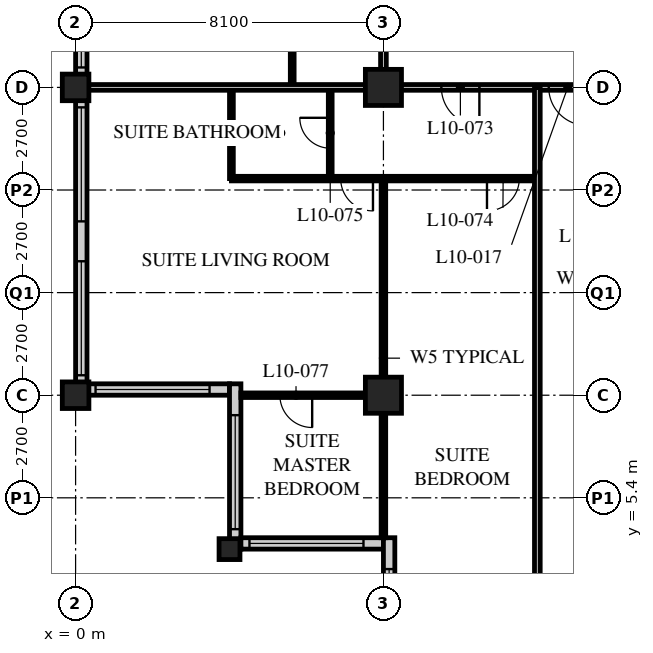
"""IFC4 building model, lengths in metres.
Left out: names, types, materials, properties, quantities, classifications, styles, units other than length and angle.
Written with IfcOpenShell. Run it as: python <this file> out.ifc"""

import sys

from ifc_helpers import new_model, si_unit, direction, frame, frame_2d, origin, origin_2d, place, context, subcontext, project, spatial, rectangle, hollow_rectangle, extrude, element, fill, save


model = new_model("IFC4")
c1 = context("Model", 3, precision=1e-05, world=origin(), true_north=direction((0.0, 1.0)))
c2 = subcontext(c1, "Body", "Model", "MODEL_VIEW")
j1 = project(units=[si_unit("LENGTHUNIT", "METRE"), si_unit("PLANEANGLEUNIT", "RADIAN")], contexts=[c1])
p1 = place(None, origin())
s1 = spatial("IfcSite", under=j1, at=p1, CompositionType="ELEMENT")
p2 = place(p1, origin())
s2 = spatial("IfcBuilding", under=s1, at=p2, CompositionType="ELEMENT")
p3 = place(p2, frame((0.0, 0.0, 46.6)))
s3 = spatial("IfcBuildingStorey", under=s2, at=p3, CompositionType="ELEMENT", Elevation=46.6)
for number, where, z_axis, x_axis in (
    (1, (0.0, 8.1, 0.0), (0.0, 0.0, 1.0), (1.0, 0.0, 0.0)),
    (2, (0.0, 16.2, 0.0), (0.0, 0.0, 1.0), (1.0, 0.0, 0.0)),
):
    element("IfcColumn", number, at=place(p3, frame(where, z_axis=z_axis, x_axis=x_axis)), inside=s3, PredefinedType="COLUMN", context=c2, shape_type="SweptSolid", body=[
        extrude(hollow_rectangle(XDim=0.7, YDim=0.7, WallThickness=0.06, at=origin_2d()), origin(), (0.0, 0.0, 1.0), 3.4),
    ])
p4 = place(p3, frame((4.05, 4.05, 0.0), z_axis=(0.0, 0.0, 1.0), x_axis=(1.0, 0.0, 0.0)))
e3 = element("IfcColumn", 3, at=p4, inside=s3, PredefinedType="COLUMN", context=c2, shape_type="SweptSolid", body=[
    extrude(hollow_rectangle(XDim=0.55, YDim=0.55, WallThickness=0.05, at=origin_2d()), origin(), (0.0, 0.0, 1.0), 3.4),
])
for number, where, z_axis, x_axis in (
    (4, (8.1, 8.1, 0.0), (0.0, 0.0, 1.0), (1.0, 0.0, 0.0)),
    (5, (8.1, 16.2, 0.0), (0.0, 0.0, 1.0), (1.0, 0.0, 0.0)),
):
    element("IfcColumn", number, at=place(p3, frame(where, z_axis=z_axis, x_axis=x_axis)), inside=s3, PredefinedType="COLUMN", context=c2, shape_type="SweptSolid", body=[
        extrude(hollow_rectangle(XDim=0.95, YDim=0.95, WallThickness=0.095, at=origin_2d()), origin(), (0.0, 0.0, 1.0), 3.4),
    ])
p5 = place(p3, frame((0.15, 40.2, 0.0), z_axis=(0.0, 0.0, 1.0), x_axis=(0.0, -1.0, 0.0)))
e6 = element("IfcWall", 6, at=p5, inside=s3, PredefinedType="SOLIDWALL", context=c2, shape_type="SweptSolid", body=[
    extrude(rectangle(XDim=32.1, YDim=0.3, at=frame_2d((16.05, 0.0))), origin(), (0.0, 0.0, 1.0), 3.19),
])
p6 = place(p5, frame((0.225, 0.0, 0.9)))
e7 = element("IfcOpeningElement", 7, at=p6, cuts=e6, PredefinedType="OPENING", context=c2, shape_type="SweptSolid", body=[
    extrude(rectangle(XDim=3.0, YDim=2.0, at=frame_2d((1.5, 1.0))), frame((0.0, 0.16, 0.0), z_axis=(0.0, -1.0, 0.0), x_axis=(1.0, 0.0, 0.0)), (0.0, 0.0, 1.0), 0.32),
])
p7 = place(p5, frame((4.275, 0.0, 0.9)))
e8 = element("IfcOpeningElement", 8, at=p7, cuts=e6, PredefinedType="OPENING", context=c2, shape_type="SweptSolid", body=[
    extrude(rectangle(XDim=3.0, YDim=2.0, at=frame_2d((1.5, 1.0))), frame((0.0, 0.16, 0.0), z_axis=(0.0, -1.0, 0.0), x_axis=(1.0, 0.0, 0.0)), (0.0, 0.0, 1.0), 0.32),
])
p8 = place(p5, frame((8.325, 0.0, 0.9)))
e9 = element("IfcOpeningElement", 9, at=p8, cuts=e6, PredefinedType="OPENING", context=c2, shape_type="SweptSolid", body=[
    extrude(rectangle(XDim=3.0, YDim=2.0, at=frame_2d((1.5, 1.0))), frame((0.0, 0.16, 0.0), z_axis=(0.0, -1.0, 0.0), x_axis=(1.0, 0.0, 0.0)), (0.0, 0.0, 1.0), 0.32),
])
p9 = place(p5, frame((12.375, 0.0, 0.9)))
e10 = element("IfcOpeningElement", 10, at=p9, cuts=e6, PredefinedType="OPENING", context=c2, shape_type="SweptSolid", body=[
    extrude(rectangle(XDim=3.0, YDim=2.0, at=frame_2d((1.5, 1.0))), frame((0.0, 0.16, 0.0), z_axis=(0.0, -1.0, 0.0), x_axis=(1.0, 0.0, 0.0)), (0.0, 0.0, 1.0), 0.32),
])
p10 = place(p5, frame((16.425, 0.0, 0.9)))
e11 = element("IfcOpeningElement", 11, at=p10, cuts=e6, PredefinedType="OPENING", context=c2, shape_type="SweptSolid", body=[
    extrude(rectangle(XDim=3.0, YDim=2.0, at=frame_2d((1.5, 1.0))), frame((0.0, 0.16, 0.0), z_axis=(0.0, -1.0, 0.0), x_axis=(1.0, 0.0, 0.0)), (0.0, 0.0, 1.0), 0.32),
])
p11 = place(p5, frame((20.475, 0.0, 0.9)))
e12 = element("IfcOpeningElement", 12, at=p11, cuts=e6, PredefinedType="OPENING", context=c2, shape_type="SweptSolid", body=[
    extrude(rectangle(XDim=3.0, YDim=2.0, at=frame_2d((1.5, 1.0))), frame((0.0, 0.16, 0.0), z_axis=(0.0, -1.0, 0.0), x_axis=(1.0, 0.0, 0.0)), (0.0, 0.0, 1.0), 0.32),
])
p12 = place(p5, frame((24.525, 0.0, 0.9)))
e13 = element("IfcOpeningElement", 13, at=p12, cuts=e6, PredefinedType="OPENING", context=c2, shape_type="SweptSolid", body=[
    extrude(rectangle(XDim=3.0, YDim=2.0, at=frame_2d((1.5, 1.0))), frame((0.0, 0.16, 0.0), z_axis=(0.0, -1.0, 0.0), x_axis=(1.0, 0.0, 0.0)), (0.0, 0.0, 1.0), 0.32),
])
p13 = place(p5, frame((28.575, 0.0, 0.9)))
e14 = element("IfcOpeningElement", 14, at=p13, cuts=e6, PredefinedType="OPENING", context=c2, shape_type="SweptSolid", body=[
    extrude(rectangle(XDim=3.0, YDim=2.0, at=frame_2d((1.5, 1.0))), frame((0.0, 0.16, 0.0), z_axis=(0.0, -1.0, 0.0), x_axis=(1.0, 0.0, 0.0)), (0.0, 0.0, 1.0), 0.32),
])
p14 = place(p3, frame((0.3, 8.25, 0.0), z_axis=(0.0, 0.0, 1.0), x_axis=(1.0, 0.0, 0.0)))
e15 = element("IfcWall", 15, at=p14, inside=s3, PredefinedType="SOLIDWALL", context=c2, shape_type="SweptSolid", body=[
    extrude(rectangle(XDim=3.75, YDim=0.3, at=frame_2d((1.875, 0.0))), origin(), (0.0, 0.0, 1.0), 3.19),
])
p15 = place(p14, frame((0.225, 0.0, 0.9)))
e16 = element("IfcOpeningElement", 16, at=p15, cuts=e15, PredefinedType="OPENING", context=c2, shape_type="SweptSolid", body=[
    extrude(rectangle(XDim=3.0, YDim=1.5, at=frame_2d((1.5, 0.75))), frame((0.0, 0.16, 0.0), z_axis=(0.0, -1.0, 0.0), x_axis=(1.0, 0.0, 0.0)), (0.0, 0.0, 1.0), 0.32),
])
p16 = place(p3, frame((4.2, 8.4, 0.0), z_axis=(0.0, 0.0, 1.0), x_axis=(0.0, -1.0, 0.0)))
e17 = element("IfcWall", 17, at=p16, inside=s3, PredefinedType="SOLIDWALL", context=c2, shape_type="SweptSolid", body=[
    extrude(rectangle(XDim=4.35, YDim=0.3, at=frame_2d((2.175, 0.0))), origin(), (0.0, 0.0, 1.0), 3.19),
])
p17 = place(p16, frame((0.825, 0.0, 0.9)))
e18 = element("IfcOpeningElement", 18, at=p17, cuts=e17, PredefinedType="OPENING", context=c2, shape_type="SweptSolid", body=[
    extrude(rectangle(XDim=3.0, YDim=1.5, at=frame_2d((1.5, 0.75))), frame((0.0, 0.16, 0.0), z_axis=(0.0, -1.0, 0.0), x_axis=(1.0, 0.0, 0.0)), (0.0, 0.0, 1.0), 0.32),
])
p18 = place(p3, frame((4.35, 4.2, 0.0), z_axis=(0.0, 0.0, 1.0), x_axis=(1.0, 0.0, 0.0)))
e19 = element("IfcWall", 19, at=p18, inside=s3, PredefinedType="SOLIDWALL", context=c2, shape_type="SweptSolid", body=[
    extrude(rectangle(XDim=3.75, YDim=0.3, at=frame_2d((1.875, 0.0))), origin(), (0.0, 0.0, 1.0), 3.19),
])
p19 = place(p18, frame((0.225, 0.0, 0.9)))
e20 = element("IfcOpeningElement", 20, at=p19, cuts=e19, PredefinedType="OPENING", context=c2, shape_type="SweptSolid", body=[
    extrude(rectangle(XDim=3.0, YDim=1.5, at=frame_2d((1.5, 0.75))), frame((0.0, 0.16, 0.0), z_axis=(0.0, -1.0, 0.0), x_axis=(1.0, 0.0, 0.0)), (0.0, 0.0, 1.0), 0.32),
])
p20 = place(p3, frame((8.25, 4.35, 0.0), z_axis=(0.0, 0.0, 1.0), x_axis=(0.0, -1.0, 0.0)))
e21 = element("IfcWall", 21, at=p20, inside=s3, PredefinedType="SOLIDWALL", context=c2, shape_type="SweptSolid", body=[
    extrude(rectangle(XDim=4.35, YDim=0.3, at=frame_2d((2.175, 0.0))), origin(), (0.0, 0.0, 1.0), 3.19),
])
p21 = place(p20, frame((0.825, 0.0, 0.9)))
e22 = element("IfcOpeningElement", 22, at=p21, cuts=e21, PredefinedType="OPENING", context=c2, shape_type="SweptSolid", body=[
    extrude(rectangle(XDim=3.0, YDim=1.5, at=frame_2d((1.5, 0.75))), frame((0.0, 0.16, 0.0), z_axis=(0.0, -1.0, 0.0), x_axis=(1.0, 0.0, 0.0)), (0.0, 0.0, 1.0), 0.32),
])
p22 = place(p3, frame((8.1, 16.2, 0.0), z_axis=(0.0, 0.0, 1.0), x_axis=(1.0, 0.0, 0.0)))
e23 = element("IfcWall", 23, at=p22, inside=s3, PredefinedType="PARTITIONING", context=c2, shape_type="SweptSolid", body=[
    extrude(rectangle(XDim=40.5, YDim=0.15, at=frame_2d((20.25, 0.0))), origin(), (0.0, 0.0, 1.0), 2.578),
])
p23 = place(p22, frame((4.35, 0.0, 0.0)))
e24 = element("IfcOpeningElement", 24, at=p23, cuts=e23, PredefinedType="OPENING", context=c2, shape_type="SweptSolid", body=[
    extrude(rectangle(XDim=1.0, YDim=2.1, at=frame_2d((0.5, 1.05))), frame((0.0, 0.085, 0.0), z_axis=(0.0, -1.0, 0.0), x_axis=(1.0, 0.0, 0.0)), (0.0, 0.0, 1.0), 0.17),
])
p24 = place(p22, frame((10.85, 0.0, 0.0)))
e25 = element("IfcOpeningElement", 25, at=p24, cuts=e23, PredefinedType="OPENING", context=c2, shape_type="SweptSolid", body=[
    extrude(rectangle(XDim=1.0, YDim=2.1, at=frame_2d((0.5, 1.05))), frame((0.0, 0.085, 0.0), z_axis=(0.0, -1.0, 0.0), x_axis=(1.0, 0.0, 0.0)), (0.0, 0.0, 1.0), 0.17),
])
p25 = place(p22, frame((12.75, 0.0, 0.0)))
e26 = element("IfcOpeningElement", 26, at=p25, cuts=e23, PredefinedType="OPENING", context=c2, shape_type="SweptSolid", body=[
    extrude(rectangle(XDim=1.0, YDim=2.1, at=frame_2d((0.5, 1.05))), frame((0.0, 0.085, 0.0), z_axis=(0.0, -1.0, 0.0), x_axis=(1.0, 0.0, 0.0)), (0.0, 0.0, 1.0), 0.17),
])
p26 = place(p22, frame((18.95, 0.0, 0.0)))
e27 = element("IfcOpeningElement", 27, at=p26, cuts=e23, PredefinedType="OPENING", context=c2, shape_type="SweptSolid", body=[
    extrude(rectangle(XDim=1.0, YDim=2.1, at=frame_2d((0.5, 1.05))), frame((0.0, 0.085, 0.0), z_axis=(0.0, -1.0, 0.0), x_axis=(1.0, 0.0, 0.0)), (0.0, 0.0, 1.0), 0.17),
])
p27 = place(p22, frame((20.55, 0.0, 0.0)))
e28 = element("IfcOpeningElement", 28, at=p27, cuts=e23, PredefinedType="OPENING", context=c2, shape_type="SweptSolid", body=[
    extrude(rectangle(XDim=1.0, YDim=2.1, at=frame_2d((0.5, 1.05))), frame((0.0, 0.085, 0.0), z_axis=(0.0, -1.0, 0.0), x_axis=(1.0, 0.0, 0.0)), (0.0, 0.0, 1.0), 0.17),
])
p28 = place(p22, frame((27.05, 0.0, 0.0)))
e29 = element("IfcOpeningElement", 29, at=p28, cuts=e23, PredefinedType="OPENING", context=c2, shape_type="SweptSolid", body=[
    extrude(rectangle(XDim=1.0, YDim=2.1, at=frame_2d((0.5, 1.05))), frame((0.0, 0.085, 0.0), z_axis=(0.0, -1.0, 0.0), x_axis=(1.0, 0.0, 0.0)), (0.0, 0.0, 1.0), 0.17),
])
p29 = place(p22, frame((28.95, 0.0, 0.0)))
e30 = element("IfcOpeningElement", 30, at=p29, cuts=e23, PredefinedType="OPENING", context=c2, shape_type="SweptSolid", body=[
    extrude(rectangle(XDim=1.0, YDim=2.1, at=frame_2d((0.5, 1.05))), frame((0.0, 0.085, 0.0), z_axis=(0.0, -1.0, 0.0), x_axis=(1.0, 0.0, 0.0)), (0.0, 0.0, 1.0), 0.17),
])
p30 = place(p22, frame((34.85, 0.0, 0.0)))
e31 = element("IfcOpeningElement", 31, at=p30, cuts=e23, PredefinedType="OPENING", context=c2, shape_type="SweptSolid", body=[
    extrude(rectangle(XDim=1.0, YDim=2.1, at=frame_2d((0.5, 1.05))), frame((0.0, 0.085, 0.0), z_axis=(0.0, -1.0, 0.0), x_axis=(1.0, 0.0, 0.0)), (0.0, 0.0, 1.0), 0.17),
])
p31 = place(p22, frame((1.525, 0.0, 0.0)))
e32 = element("IfcOpeningElement", 32, at=p31, cuts=e23, PredefinedType="OPENING", context=c2, shape_type="SweptSolid", body=[
    extrude(rectangle(XDim=1.0, YDim=2.1, at=frame_2d((0.5, 1.05))), frame((0.0, 0.085, 0.0), z_axis=(0.0, -1.0, 0.0), x_axis=(1.0, 0.0, 0.0)), (0.0, 0.0, 1.0), 0.17),
])
p32 = place(p22, frame((37.975, 0.0, 0.0)))
e33 = element("IfcOpeningElement", 33, at=p32, cuts=e23, PredefinedType="OPENING", context=c2, shape_type="SweptSolid", body=[
    extrude(rectangle(XDim=1.0, YDim=2.1, at=frame_2d((0.5, 1.05))), frame((0.0, 0.085, 0.0), z_axis=(0.0, -1.0, 0.0), x_axis=(1.0, 0.0, 0.0)), (0.0, 0.0, 1.0), 0.17),
])
p33 = place(p3, frame((8.1, 16.2, 0.0), z_axis=(0.0, 0.0, 1.0), x_axis=(0.0, 1.0, 0.0)))
e34 = element("IfcWall", 34, at=p33, inside=s3, PredefinedType="PARTITIONING", context=c2, shape_type="SweptSolid", body=[
    extrude(rectangle(XDim=26.1, YDim=0.15, at=frame_2d((13.05, 0.0))), origin(), (0.0, 0.0, 1.0), 2.578),
])
p34 = place(p33, frame((2.75, 0.0, 0.0)))
e35 = element("IfcOpeningElement", 35, at=p34, cuts=e34, PredefinedType="OPENING", context=c2, shape_type="SweptSolid", body=[
    extrude(rectangle(XDim=1.0, YDim=2.1, at=frame_2d((0.5, 1.05))), frame((0.0, 0.085, 0.0), z_axis=(0.0, -1.0, 0.0), x_axis=(1.0, 0.0, 0.0)), (0.0, 0.0, 1.0), 0.17),
])
p35 = place(p33, frame((4.35, 0.0, 0.0)))
e36 = element("IfcOpeningElement", 36, at=p35, cuts=e34, PredefinedType="OPENING", context=c2, shape_type="SweptSolid", body=[
    extrude(rectangle(XDim=1.0, YDim=2.1, at=frame_2d((0.5, 1.05))), frame((0.0, 0.085, 0.0), z_axis=(0.0, -1.0, 0.0), x_axis=(1.0, 0.0, 0.0)), (0.0, 0.0, 1.0), 0.17),
])
p36 = place(p33, frame((10.85, 0.0, 0.0)))
e37 = element("IfcOpeningElement", 37, at=p36, cuts=e34, PredefinedType="OPENING", context=c2, shape_type="SweptSolid", body=[
    extrude(rectangle(XDim=1.0, YDim=2.1, at=frame_2d((0.5, 1.05))), frame((0.0, 0.085, 0.0), z_axis=(0.0, -1.0, 0.0), x_axis=(1.0, 0.0, 0.0)), (0.0, 0.0, 1.0), 0.17),
])
p37 = place(p33, frame((12.45, 0.0, 0.0)))
e38 = element("IfcOpeningElement", 38, at=p37, cuts=e34, PredefinedType="OPENING", context=c2, shape_type="SweptSolid", body=[
    extrude(rectangle(XDim=1.0, YDim=2.1, at=frame_2d((0.5, 1.05))), frame((0.0, 0.085, 0.0), z_axis=(0.0, -1.0, 0.0), x_axis=(1.0, 0.0, 0.0)), (0.0, 0.0, 1.0), 0.17),
])
p38 = place(p33, frame((18.65, 0.0, 0.0)))
e39 = element("IfcOpeningElement", 39, at=p38, cuts=e34, PredefinedType="OPENING", context=c2, shape_type="SweptSolid", body=[
    extrude(rectangle(XDim=1.0, YDim=2.1, at=frame_2d((0.5, 1.05))), frame((0.0, 0.085, 0.0), z_axis=(0.0, -1.0, 0.0), x_axis=(1.0, 0.0, 0.0)), (0.0, 0.0, 1.0), 0.17),
])
p39 = place(p33, frame((22.7, 0.0, 0.0)))
e40 = element("IfcOpeningElement", 40, at=p39, cuts=e34, PredefinedType="OPENING", context=c2, shape_type="SweptSolid", body=[
    extrude(rectangle(XDim=1.0, YDim=2.1, at=frame_2d((0.5, 1.05))), frame((0.0, 0.085, 0.0), z_axis=(0.0, -1.0, 0.0), x_axis=(1.0, 0.0, 0.0)), (0.0, 0.0, 1.0), 0.17),
])
p40 = place(p3, frame((5.7, 16.2, 0.0), z_axis=(0.0, 0.0, 1.0), x_axis=(0.0, 1.0, 0.0)))
e41 = element("IfcWall", 41, at=p40, inside=s3, PredefinedType="PARTITIONING", context=c2, shape_type="SweptSolid", body=[
    extrude(rectangle(XDim=2.6, YDim=0.1, at=frame_2d((1.3, 0.0))), origin(), (0.0, 0.0, 1.0), 3.19),
])
p41 = place(p3, frame((6.7, 16.2, 0.0), z_axis=(0.0, 0.0, 1.0), x_axis=(0.0, -1.0, 0.0)))
e42 = element("IfcWall", 42, at=p41, inside=s3, PredefinedType="PARTITIONING", context=c2, shape_type="SweptSolid", body=[
    extrude(rectangle(XDim=2.4, YDim=0.1, at=frame_2d((1.2, 0.0))), origin(), (0.0, 0.0, 1.0), 3.19),
])
p42 = place(p41, frame((0.8, 0.0, 0.0)))
e43 = element("IfcOpeningElement", 43, at=p42, cuts=e42, PredefinedType="OPENING", context=c2, shape_type="SweptSolid", body=[
    extrude(rectangle(XDim=0.8, YDim=2.1, at=frame_2d((0.4, 1.05))), frame((0.0, 0.06, 0.0), z_axis=(0.0, -1.0, 0.0), x_axis=(1.0, 0.0, 0.0)), (0.0, 0.0, 1.0), 0.12),
])
p43 = place(p3, frame((4.1, 16.2, 0.0), z_axis=(0.0, 0.0, 1.0), x_axis=(0.0, -1.0, 0.0)))
e44 = element("IfcWall", 44, at=p43, inside=s3, PredefinedType="PARTITIONING", context=c2, shape_type="SweptSolid", body=[
    extrude(rectangle(XDim=2.4, YDim=0.1, at=frame_2d((1.2, 0.0))), origin(), (0.0, 0.0, 1.0), 3.19),
])
p44 = place(p3, frame((4.1, 13.8, 0.0), z_axis=(0.0, 0.0, 1.0), x_axis=(1.0, 0.0, 0.0)))
e45 = element("IfcWall", 45, at=p44, inside=s3, PredefinedType="PARTITIONING", context=c2, shape_type="SweptSolid", body=[
    extrude(rectangle(XDim=8.05, YDim=0.12, at=frame_2d((4.025, 0.0))), origin(), (0.0, 0.0, 1.0), 3.19),
])
p45 = place(p44, frame((6.725, 0.0, 0.0)))
e46 = element("IfcOpeningElement", 46, at=p45, cuts=e45, PredefinedType="OPENING", context=c2, shape_type="SweptSolid", body=[
    extrude(rectangle(XDim=0.85, YDim=2.1, at=frame_2d((0.425, 1.05))), frame((0.0, 0.07, 0.0), z_axis=(0.0, -1.0, 0.0), x_axis=(1.0, 0.0, 0.0)), (0.0, 0.0, 1.0), 0.14),
])
p46 = place(p44, frame((2.875, 0.0, 0.0)))
e47 = element("IfcOpeningElement", 47, at=p46, cuts=e45, PredefinedType="OPENING", context=c2, shape_type="SweptSolid", body=[
    extrude(rectangle(XDim=0.85, YDim=2.1, at=frame_2d((0.425, 1.05))), frame((0.0, 0.07, 0.0), z_axis=(0.0, -1.0, 0.0), x_axis=(1.0, 0.0, 0.0)), (0.0, 0.0, 1.0), 0.14),
])
p47 = place(p3, frame((8.1, 13.8, 0.0), z_axis=(0.0, 0.0, 1.0), x_axis=(0.0, -1.0, 0.0)))
e48 = element("IfcWall", 48, at=p47, inside=s3, PredefinedType="PARTITIONING", context=c2, shape_type="SweptSolid", body=[
    extrude(rectangle(XDim=9.45, YDim=0.12, at=frame_2d((4.725, 0.0))), origin(), (0.0, 0.0, 1.0), 2.578),
])
p48 = place(p3, frame((8.1, 8.1, 0.0), z_axis=(0.0, 0.0, 1.0), x_axis=(-1.0, 0.0, 0.0)))
e49 = element("IfcWall", 49, at=p48, inside=s3, PredefinedType="PARTITIONING", context=c2, shape_type="SweptSolid", body=[
    extrude(rectangle(XDim=3.75, YDim=0.12, at=frame_2d((1.875, 0.0))), origin(), (0.0, 0.0, 1.0), 2.578),
])
p49 = place(p48, frame((1.875, 0.0, 0.0)))
e50 = element("IfcOpeningElement", 50, at=p49, cuts=e49, PredefinedType="OPENING", context=c2, shape_type="SweptSolid", body=[
    extrude(rectangle(XDim=0.85, YDim=2.1, at=frame_2d((0.425, 1.05))), frame((0.0, 0.07, 0.0), z_axis=(0.0, -1.0, 0.0), x_axis=(1.0, 0.0, 0.0)), (0.0, 0.0, 1.0), 0.14),
])
p50 = place(p3, frame((0.3, 16.2, 0.0), z_axis=(0.0, 0.0, 1.0), x_axis=(1.0, 0.0, 0.0)))
e51 = element("IfcWall", 51, at=p50, inside=s3, PredefinedType="PARTITIONING", context=c2, shape_type="SweptSolid", body=[
    extrude(rectangle(XDim=7.8, YDim=0.15, at=frame_2d((3.9, 0.0))), origin(), (0.0, 0.0, 1.0), 2.578),
])
p51 = place(p3, frame((12.15, 16.2, 0.0), z_axis=(0.0, 0.0, 1.0), x_axis=(0.0, -1.0, 0.0)))
e52 = element("IfcWall", 52, at=p51, inside=s3, PredefinedType="PARTITIONING", context=c2, shape_type="SweptSolid", body=[
    extrude(rectangle(XDim=15.9, YDim=0.15, at=frame_2d((7.95, 0.0))), origin(), (0.0, 0.0, 1.0), 3.19),
])
p52 = place(p11, origin())
e53 = element("IfcWindow", 53, at=p52, inside=s3, PartitioningType="SINGLE_PANEL", PredefinedType="WINDOW", context=c2, shape_type="SweptSolid", body=[
    extrude(rectangle(XDim=3.0, YDim=2.0, at=frame_2d((1.5, 1.0))), frame((0.0, 0.03, 0.0), z_axis=(0.0, -1.0, 0.0), x_axis=(1.0, 0.0, 0.0)), (0.0, 0.0, 1.0), 0.06),
])
fill(e12, e53)
p53 = place(p12, origin())
e54 = element("IfcWindow", 54, at=p53, inside=s3, PartitioningType="SINGLE_PANEL", PredefinedType="WINDOW", context=c2, shape_type="SweptSolid", body=[
    extrude(rectangle(XDim=3.0, YDim=2.0, at=frame_2d((1.5, 1.0))), frame((0.0, 0.03, 0.0), z_axis=(0.0, -1.0, 0.0), x_axis=(1.0, 0.0, 0.0)), (0.0, 0.0, 1.0), 0.06),
])
fill(e13, e54)
p54 = place(p13, origin())
e55 = element("IfcWindow", 55, at=p54, inside=s3, PartitioningType="SINGLE_PANEL", PredefinedType="WINDOW", context=c2, shape_type="SweptSolid", body=[
    extrude(rectangle(XDim=3.0, YDim=2.0, at=frame_2d((1.5, 1.0))), frame((0.0, 0.03, 0.0), z_axis=(0.0, -1.0, 0.0), x_axis=(1.0, 0.0, 0.0)), (0.0, 0.0, 1.0), 0.06),
])
fill(e14, e55)
p55 = place(p15, origin())
e56 = element("IfcWindow", 56, at=p55, inside=s3, PartitioningType="SINGLE_PANEL", PredefinedType="WINDOW", context=c2, shape_type="SweptSolid", body=[
    extrude(rectangle(XDim=3.0, YDim=1.5, at=frame_2d((1.5, 0.75))), frame((0.0, 0.03, 0.0), z_axis=(0.0, -1.0, 0.0), x_axis=(1.0, 0.0, 0.0)), (0.0, 0.0, 1.0), 0.06),
])
fill(e16, e56)
p56 = place(p17, origin())
e57 = element("IfcWindow", 57, at=p56, inside=s3, PartitioningType="SINGLE_PANEL", PredefinedType="WINDOW", context=c2, shape_type="SweptSolid", body=[
    extrude(rectangle(XDim=3.0, YDim=1.5, at=frame_2d((1.5, 0.75))), frame((0.0, 0.03, 0.0), z_axis=(0.0, -1.0, 0.0), x_axis=(1.0, 0.0, 0.0)), (0.0, 0.0, 1.0), 0.06),
])
fill(e18, e57)
p57 = place(p19, origin())
e58 = element("IfcWindow", 58, at=p57, inside=s3, PartitioningType="SINGLE_PANEL", PredefinedType="WINDOW", context=c2, shape_type="SweptSolid", body=[
    extrude(rectangle(XDim=3.0, YDim=1.5, at=frame_2d((1.5, 0.75))), frame((0.0, 0.03, 0.0), z_axis=(0.0, -1.0, 0.0), x_axis=(1.0, 0.0, 0.0)), (0.0, 0.0, 1.0), 0.06),
])
fill(e20, e58)
p58 = place(p21, origin())
e59 = element("IfcWindow", 59, at=p58, inside=s3, PartitioningType="SINGLE_PANEL", PredefinedType="WINDOW", context=c2, shape_type="SweptSolid", body=[
    extrude(rectangle(XDim=3.0, YDim=1.5, at=frame_2d((1.5, 0.75))), frame((0.0, 0.03, 0.0), z_axis=(0.0, -1.0, 0.0), x_axis=(1.0, 0.0, 0.0)), (0.0, 0.0, 1.0), 0.06),
])
fill(e22, e59)
p59 = place(p23, origin())
e60 = element("IfcDoor", 60, at=p59, inside=s3, OperationType="SINGLE_SWING_LEFT", PredefinedType="DOOR", context=c2, shape_type="SweptSolid", body=[
    extrude(rectangle(XDim=1.0, YDim=2.1, at=frame_2d((0.5, 1.05))), frame((0.0, 0.025, 0.0), z_axis=(0.0, -1.0, 0.0), x_axis=(1.0, 0.0, 0.0)), (0.0, 0.0, 1.0), 0.05),
])
fill(e24, e60)
p60 = place(p31, origin())
e61 = element("IfcDoor", 61, at=p60, inside=s3, OperationType="SINGLE_SWING_LEFT", PredefinedType="DOOR", context=c2, shape_type="SweptSolid", body=[
    extrude(rectangle(XDim=1.0, YDim=2.1, at=frame_2d((0.5, 1.05))), frame((0.0, 0.025, 0.0), z_axis=(0.0, -1.0, 0.0), x_axis=(1.0, 0.0, 0.0)), (0.0, 0.0, 1.0), 0.05),
])
fill(e32, e61)
p61 = place(p45, origin())
e62 = element("IfcDoor", 62, at=p61, inside=s3, OperationType="SINGLE_SWING_RIGHT", PredefinedType="DOOR", context=c2, shape_type="SweptSolid", body=[
    extrude(rectangle(XDim=0.85, YDim=2.1, at=frame_2d((0.425, 1.05))), frame((0.0, 0.025, 0.0), z_axis=(0.0, -1.0, 0.0), x_axis=(1.0, 0.0, 0.0)), (0.0, 0.0, 1.0), 0.05),
])
fill(e46, e62)
p62 = place(p42, origin())
e63 = element("IfcDoor", 63, at=p62, inside=s3, OperationType="SINGLE_SWING_RIGHT", PredefinedType="DOOR", context=c2, shape_type="SweptSolid", body=[
    extrude(rectangle(XDim=0.8, YDim=2.1, at=frame_2d((0.4, 1.05))), frame((0.0, 0.025, 0.0), z_axis=(0.0, -1.0, 0.0), x_axis=(1.0, 0.0, 0.0)), (0.0, 0.0, 1.0), 0.05),
])
fill(e43, e63)
p63 = place(p46, origin())
e64 = element("IfcDoor", 64, at=p63, inside=s3, OperationType="SINGLE_SWING_LEFT", PredefinedType="DOOR", context=c2, shape_type="SweptSolid", body=[
    extrude(rectangle(XDim=0.85, YDim=2.1, at=frame_2d((0.425, 1.05))), frame((0.0, 0.025, 0.0), z_axis=(0.0, -1.0, 0.0), x_axis=(1.0, 0.0, 0.0)), (0.0, 0.0, 1.0), 0.05),
])
fill(e47, e64)
p64 = place(p49, origin())
e65 = element("IfcDoor", 65, at=p64, inside=s3, OperationType="SINGLE_SWING_LEFT", PredefinedType="DOOR", context=c2, shape_type="SweptSolid", body=[
    extrude(rectangle(XDim=0.85, YDim=2.1, at=frame_2d((0.425, 1.05))), frame((0.0, 0.025, 0.0), z_axis=(0.0, -1.0, 0.0), x_axis=(1.0, 0.0, 0.0)), (0.0, 0.0, 1.0), 0.05),
])
fill(e50, e65)
save(model, sys.argv[1])
